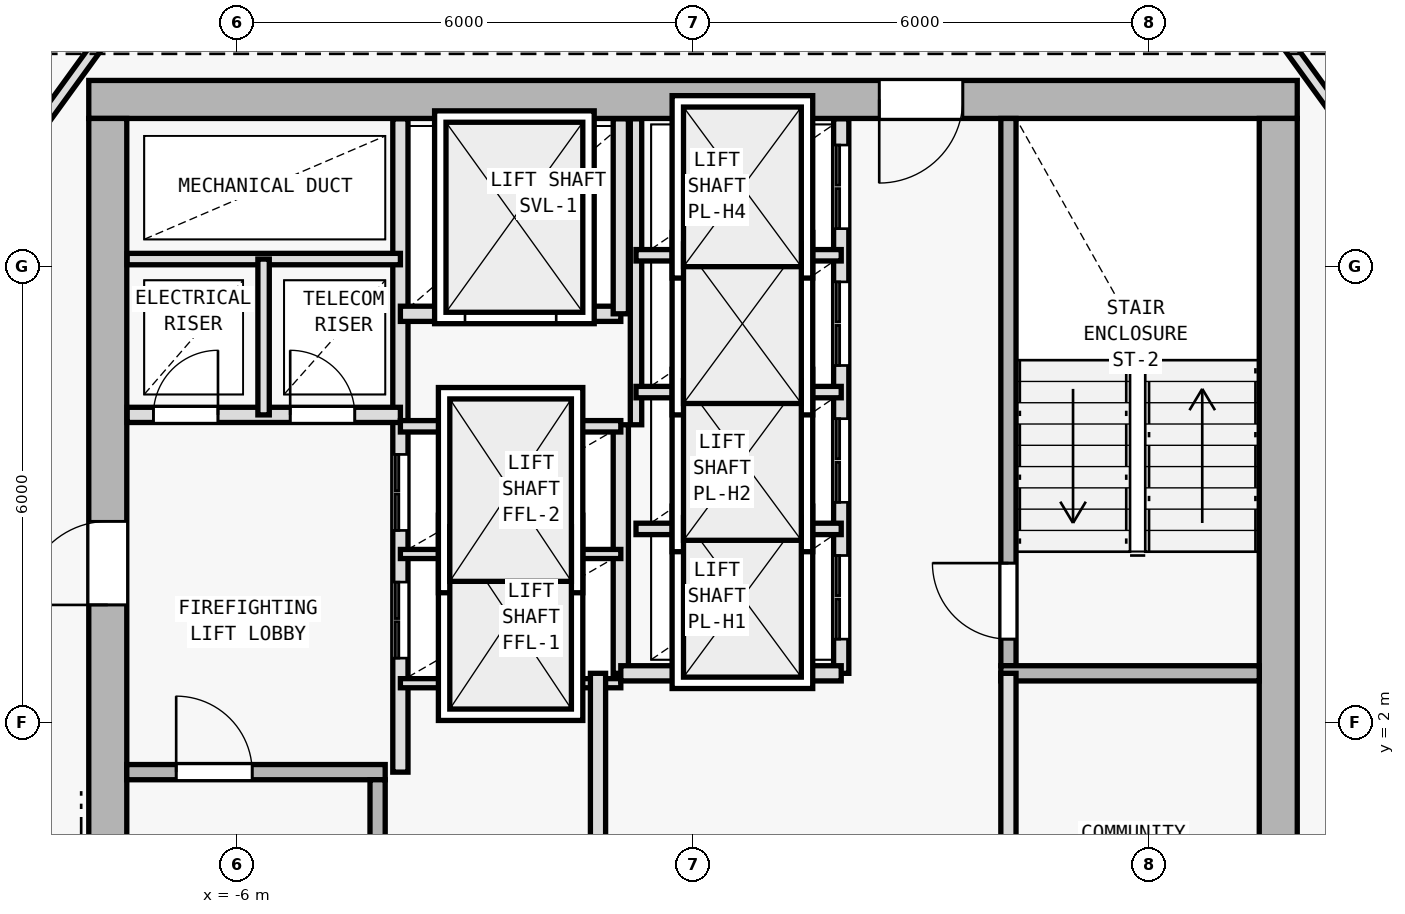
"""IFC4 building model, lengths in metres.
Left out: names, types, materials, properties, quantities, classifications, styles, units other than length and angle.
Written with IfcOpenShell. Run it as: python <this file> out.ifc"""

import sys

from ifc_helpers import new_model, si_unit, direction, frame, frame_2d, origin, origin_2d, place, context, subcontext, project, spatial, rectangle, i_section, extrude, element, fill, save


model = new_model("IFC4")
c1 = context("Model", 3, precision=1e-05, world=origin(), true_north=direction((0.0, 1.0)))
c2 = subcontext(c1, "Body", "Model", "MODEL_VIEW")
j1 = project(units=[si_unit("LENGTHUNIT", "METRE"), si_unit("PLANEANGLEUNIT", "RADIAN")], contexts=[c1])
p1 = place(None, origin())
s1 = spatial("IfcSite", under=j1, at=p1, CompositionType="ELEMENT")
p2 = place(p1, origin())
s2 = spatial("IfcBuilding", under=s1, at=p2, CompositionType="ELEMENT")
p3 = place(p2, frame((0.0, 0.0, 290.4)))
s3 = spatial("IfcBuildingStorey", under=s2, at=p3, CompositionType="ELEMENT", Elevation=290.4)
for number, where, z_axis, x_axis in (
    (1, (7.7, 10.2, 0.0), (0.0, 0.0, 1.0), (1.0, 0.0, 0.0)),
    (2, (-7.7, 10.2, 0.0), (0.0, 0.0, 1.0), (1.0, 0.0, 0.0)),
    (3, (7.7, 0.4, 0.0), (0.0, 0.0, 1.0), (1.0, 0.0, 0.0)),
    (4, (-7.7, 2.0, 0.0), (0.0, 0.0, 1.0), (1.0, 0.0, 0.0)),
):
    element("IfcColumn", number, at=place(p3, frame(where, z_axis=z_axis, x_axis=x_axis)), inside=s3, PredefinedType="COLUMN", context=c2, shape_type="SweptSolid", body=[
        extrude(i_section(OverallWidth=0.374, OverallDepth=0.372, WebThickness=0.012, FlangeThickness=0.02, FilletRadius=0.015, at=origin_2d()), origin(), (0.0, 0.0, 1.0), 3.6),
    ])
p4 = place(p3, frame((7.95, 10.2, 0.0), z_axis=(0.0, 0.0, 1.0), x_axis=(-1.0, 0.0, 0.0)))
e5 = element("IfcWall", 5, at=p4, inside=s3, PredefinedType="SHEAR", context=c2, shape_type="SweptSolid", body=[
    extrude(rectangle(XDim=15.9, YDim=0.5, at=frame_2d((7.95, 0.0))), origin(), (0.0, 0.0, 1.0), 3.15),
])
p5 = place(p4, frame((4.4, 0.0, 0.0)))
e6 = element("IfcOpeningElement", 6, at=p5, cuts=e5, PredefinedType="OPENING", context=c2, shape_type="SweptSolid", body=[
    extrude(rectangle(XDim=1.1, YDim=2.15, at=frame_2d((0.55, 1.075))), frame((0.0, 0.26, 0.0), z_axis=(0.0, -1.0, 0.0), x_axis=(1.0, 0.0, 0.0)), (0.0, 0.0, 1.0), 0.52),
])
p6 = place(p3, frame((-7.7, -9.15, 0.0), z_axis=(0.0, 0.0, 1.0), x_axis=(0.0, 1.0, 0.0)))
e7 = element("IfcWall", 7, at=p6, inside=s3, PredefinedType="SHEAR", context=c2, shape_type="SweptSolid", body=[
    extrude(rectangle(XDim=19.1, YDim=0.5, at=frame_2d((9.55, 0.0))), origin(), (0.0, 0.0, 1.0), 3.15),
])
p7 = place(p6, frame((12.7, 0.0, 0.0)))
e8 = element("IfcOpeningElement", 8, at=p7, cuts=e7, PredefinedType="OPENING", context=c2, shape_type="SweptSolid", body=[
    extrude(rectangle(XDim=1.1, YDim=2.15, at=frame_2d((0.55, 1.075))), frame((0.0, 0.26, 0.0), z_axis=(0.0, -1.0, 0.0), x_axis=(1.0, 0.0, 0.0)), (0.0, 0.0, 1.0), 0.52),
])
p8 = place(p3, frame((7.7, 9.95, 0.0), z_axis=(0.0, 0.0, 1.0), x_axis=(0.0, -1.0, 0.0)))
e9 = element("IfcWall", 9, at=p8, inside=s3, PredefinedType="SHEAR", context=c2, shape_type="SweptSolid", body=[
    extrude(rectangle(XDim=19.1, YDim=0.5, at=frame_2d((9.55, 0.0))), origin(), (0.0, 0.0, 1.0), 3.15),
])
p9 = place(p3, frame((-7.45, 1.35, 0.0), z_axis=(0.0, 0.0, 1.0), x_axis=(1.0, 0.0, 0.0)))
e10 = element("IfcWall", 10, at=p9, inside=s3, PredefinedType="SOLIDWALL", context=c2, shape_type="SweptSolid", body=[
    extrude(rectangle(XDim=3.4, YDim=0.2, at=frame_2d((1.7, 0.0))), origin(), (0.0, 0.0, 1.0), 3.15),
])
p10 = place(p9, frame((0.65, 0.0, 0.0)))
e11 = element("IfcOpeningElement", 11, at=p10, cuts=e10, PredefinedType="OPENING", context=c2, shape_type="SweptSolid", body=[
    extrude(rectangle(XDim=1.0, YDim=2.15, at=frame_2d((0.5, 1.075))), frame((0.0, 0.11, 0.0), z_axis=(0.0, -1.0, 0.0), x_axis=(1.0, 0.0, 0.0)), (0.0, 0.0, 1.0), 0.22),
])
p11 = place(p3, frame((-4.15, -5.95, 0.0), z_axis=(0.0, 0.0, 1.0), x_axis=(0.0, 1.0, 0.0)))
e12 = element("IfcWall", 12, at=p11, inside=s3, PredefinedType="SOLIDWALL", context=c2, shape_type="SweptSolid", body=[
    extrude(rectangle(XDim=7.2, YDim=0.2, at=frame_2d((3.6, 0.0))), origin(), (0.0, 0.0, 1.0), 3.15),
])
p12 = place(p3, frame((-3.85, 1.35, 0.0), z_axis=(0.0, 0.0, 1.0), x_axis=(0.0, 1.0, 0.0)))
e13 = element("IfcWall", 13, at=p12, inside=s3, PredefinedType="SOLIDWALL", context=c2, shape_type="SweptSolid", body=[
    extrude(rectangle(XDim=8.595, YDim=0.2, at=frame_2d((4.297, 0.0))), origin(), (0.0, 0.0, 1.0), 3.15),
])
p13 = place(p12, frame((1.5, 0.0, 0.0)))
e14 = element("IfcOpeningElement", 14, at=p13, cuts=e13, PredefinedType="OPENING", context=c2, shape_type="SweptSolid", body=[
    extrude(rectangle(XDim=1.0, YDim=2.15, at=frame_2d((0.5, 1.075))), frame((0.0, 0.11, 0.0), z_axis=(0.0, -1.0, 0.0), x_axis=(1.0, 0.0, 0.0)), (0.0, 0.0, 1.0), 0.22),
])
p14 = place(p12, frame((3.18, 0.0, 0.0)))
e15 = element("IfcOpeningElement", 15, at=p14, cuts=e13, PredefinedType="OPENING", context=c2, shape_type="SweptSolid", body=[
    extrude(rectangle(XDim=1.0, YDim=2.15, at=frame_2d((0.5, 1.075))), frame((0.0, 0.11, 0.0), z_axis=(0.0, -1.0, 0.0), x_axis=(1.0, 0.0, 0.0)), (0.0, 0.0, 1.0), 0.22),
])
p15 = place(p3, frame((-7.445, 6.05, 0.0), z_axis=(0.0, 0.0, 1.0), x_axis=(1.0, 0.0, 0.0)))
e16 = element("IfcWall", 16, at=p15, inside=s3, PredefinedType="SOLIDWALL", context=c2, shape_type="SweptSolid", body=[
    extrude(rectangle(XDim=3.595, YDim=0.2, at=frame_2d((1.797, 0.0))), origin(), (0.0, 0.0, 1.0), 3.15),
])
p16 = place(p15, frame((0.345, 0.0, 0.0)))
e17 = element("IfcOpeningElement", 17, at=p16, cuts=e16, PredefinedType="OPENING", context=c2, shape_type="SweptSolid", body=[
    extrude(rectangle(XDim=0.85, YDim=2.1, at=frame_2d((0.425, 1.05))), frame((0.0, 0.11, 0.0), z_axis=(0.0, -1.0, 0.0), x_axis=(1.0, 0.0, 0.0)), (0.0, 0.0, 1.0), 0.22),
])
p17 = place(p15, frame((2.145, 0.0, 0.0)))
e18 = element("IfcOpeningElement", 18, at=p17, cuts=e16, PredefinedType="OPENING", context=c2, shape_type="SweptSolid", body=[
    extrude(rectangle(XDim=0.85, YDim=2.1, at=frame_2d((0.425, 1.05))), frame((0.0, 0.11, 0.0), z_axis=(0.0, -1.0, 0.0), x_axis=(1.0, 0.0, 0.0)), (0.0, 0.0, 1.0), 0.22),
])
p18 = place(p3, frame((-7.445, 8.1, 0.0), z_axis=(0.0, 0.0, 1.0), x_axis=(1.0, 0.0, 0.0)))
e19 = element("IfcWall", 19, at=p18, inside=s3, PredefinedType="PARTITIONING", context=c2, shape_type="SweptSolid", body=[
    extrude(rectangle(XDim=3.595, YDim=0.15, at=frame_2d((1.797, 0.0))), origin(), (0.0, 0.0, 1.0), 3.15),
])
p19 = place(p3, frame((-5.65, 6.05, 0.0), z_axis=(0.0, 0.0, 1.0), x_axis=(0.0, 1.0, 0.0)))
e20 = element("IfcWall", 20, at=p19, inside=s3, PredefinedType="PARTITIONING", context=c2, shape_type="SweptSolid", body=[
    extrude(rectangle(XDim=2.05, YDim=0.15, at=frame_2d((1.025, 0.0))), origin(), (0.0, 0.0, 1.0), 3.15),
])
p20 = place(p3, frame((4.15, 2.75, 0.0), z_axis=(0.0, 0.0, 1.0), x_axis=(0.0, 1.0, 0.0)))
e21 = element("IfcWall", 21, at=p20, inside=s3, PredefinedType="SOLIDWALL", context=c2, shape_type="SweptSolid", body=[
    extrude(rectangle(XDim=7.2, YDim=0.2, at=frame_2d((3.6, 0.0))), origin(), (0.0, 0.0, 1.0), 3.15),
])
p21 = place(p20, frame((0.35, 0.0, 0.0)))
e22 = element("IfcOpeningElement", 22, at=p21, cuts=e21, PredefinedType="OPENING", context=c2, shape_type="SweptSolid", body=[
    extrude(rectangle(XDim=1.0, YDim=2.15, at=frame_2d((0.5, 1.075))), frame((0.0, 0.11, 0.0), z_axis=(0.0, -1.0, 0.0), x_axis=(1.0, 0.0, 0.0)), (0.0, 0.0, 1.0), 0.22),
])
p22 = place(p3, frame((4.05, 2.65, 0.0), z_axis=(0.0, 0.0, 1.0), x_axis=(1.0, 0.0, 0.0)))
e23 = element("IfcWall", 23, at=p22, inside=s3, PredefinedType="SOLIDWALL", context=c2, shape_type="SweptSolid", body=[
    extrude(rectangle(XDim=3.4, YDim=0.2, at=frame_2d((1.7, 0.0))), origin(), (0.0, 0.0, 1.0), 3.15),
])
p23 = place(p3, frame((-0.95, 2.65, 0.0), z_axis=(0.0, 0.0, 1.0), x_axis=(0.0, 1.0, 0.0)))
e24 = element("IfcWall", 24, at=p23, inside=s3, PredefinedType="SOLIDWALL", context=c2, shape_type="SweptSolid", body=[
    extrude(rectangle(XDim=3.27, YDim=0.2, at=frame_2d((1.635, 0.0))), origin(), (0.0, 0.0, 1.0), 3.15),
])
for number, where, z_axis, x_axis in (
    (25, (-3.85, 2.52, 0.0), (0.0, 0.0, 1.0), (1.0, 0.0, 0.0)),
    (26, (-3.85, 4.22, 0.0), (0.0, 0.0, 1.0), (1.0, 0.0, 0.0)),
):
    element("IfcWall", number, at=place(p3, frame(where, z_axis=z_axis, x_axis=x_axis)), inside=s3, PredefinedType="PARTITIONING", context=c2, shape_type="SweptSolid", body=[
        extrude(rectangle(XDim=2.9, YDim=0.12, at=frame_2d((1.45, 0.0))), origin(), (0.0, 0.0, 1.0), 3.15),
    ])
p24 = place(p3, frame((-3.85, 5.9, 0.0), z_axis=(0.0, 0.0, 1.0), x_axis=(1.0, 0.0, 0.0)))
e27 = element("IfcWall", 27, at=p24, inside=s3, PredefinedType="PARTITIONING", context=c2, shape_type="SweptSolid", body=[
    extrude(rectangle(XDim=2.9, YDim=0.15, at=frame_2d((1.45, 0.0))), origin(), (0.0, 0.0, 1.0), 3.15),
])
p25 = place(p3, frame((-3.85, 7.38, 0.0), z_axis=(0.0, 0.0, 1.0), x_axis=(1.0, 0.0, 0.0)))
e28 = element("IfcWall", 28, at=p25, inside=s3, PredefinedType="SOLIDWALL", context=c2, shape_type="SweptSolid", body=[
    extrude(rectangle(XDim=2.9, YDim=0.2, at=frame_2d((1.45, 0.0))), origin(), (0.0, 0.0, 1.0), 3.15),
])
p26 = place(p25, frame((0.85, 0.0, 0.0)))
e29 = element("IfcOpeningElement", 29, at=p26, cuts=e28, PredefinedType="OPENING", context=c2, shape_type="SweptSolid", body=[
    extrude(rectangle(XDim=1.2, YDim=2.2, at=frame_2d((0.6, 1.1))), frame((0.0, 0.11, 0.0), z_axis=(0.0, -1.0, 0.0), x_axis=(1.0, 0.0, 0.0)), (0.0, 0.0, 1.0), 0.22),
])
p27 = place(p3, frame((-0.95, 7.38, 0.0), z_axis=(0.0, 0.0, 1.0), x_axis=(0.0, 1.0, 0.0)))
e30 = element("IfcWall", 30, at=p27, inside=s3, PredefinedType="SOLIDWALL", context=c2, shape_type="SweptSolid", body=[
    extrude(rectangle(XDim=2.565, YDim=0.2, at=frame_2d((1.283, 0.0))), origin(), (0.0, 0.0, 1.0), 3.15),
])
p28 = place(p3, frame((4.15, -6.05, 0.0), z_axis=(0.0, 0.0, 1.0), x_axis=(0.0, 1.0, 0.0)))
e31 = element("IfcWall", 31, at=p28, inside=s3, PredefinedType="SOLIDWALL", context=c2, shape_type="SweptSolid", body=[
    extrude(rectangle(XDim=8.7, YDim=0.2, at=frame_2d((4.35, 0.0))), origin(), (0.0, 0.0, 1.0), 3.15),
])
p29 = place(p28, frame((3.6, 0.0, 0.0)))
e32 = element("IfcOpeningElement", 32, at=p29, cuts=e31, PredefinedType="OPENING", context=c2, shape_type="SweptSolid", body=[
    extrude(rectangle(XDim=0.95, YDim=2.1, at=frame_2d((0.475, 1.05))), frame((0.0, 0.11, 0.0), z_axis=(0.0, -1.0, 0.0), x_axis=(1.0, 0.0, 0.0)), (0.0, 0.0, 1.0), 0.22),
])
p30 = place(p3, frame((-1.25, -6.05, 0.0), z_axis=(0.0, 0.0, 1.0), x_axis=(0.0, 1.0, 0.0)))
e33 = element("IfcWall", 33, at=p30, inside=s3, PredefinedType="SOLIDWALL", context=c2, shape_type="SweptSolid", body=[
    extrude(rectangle(XDim=8.7, YDim=0.2, at=frame_2d((4.35, 0.0))), origin(), (0.0, 0.0, 1.0), 3.15),
])
p31 = place(p30, frame((3.4, 0.0, 0.0)))
e34 = element("IfcOpeningElement", 34, at=p31, cuts=e33, PredefinedType="OPENING", context=c2, shape_type="SweptSolid", body=[
    extrude(rectangle(XDim=0.95, YDim=2.1, at=frame_2d((0.475, 1.05))), frame((0.0, 0.11, 0.0), z_axis=(0.0, -1.0, 0.0), x_axis=(1.0, 0.0, 0.0)), (0.0, 0.0, 1.0), 0.22),
])
p32 = place(p3, frame((1.95, 2.65, 0.0), z_axis=(0.0, 0.0, 1.0), x_axis=(0.0, 1.0, 0.0)))
e35 = element("IfcWall", 35, at=p32, inside=s3, PredefinedType="SOLIDWALL", context=c2, shape_type="SweptSolid", body=[
    extrude(rectangle(XDim=7.295, YDim=0.2, at=frame_2d((3.647, 0.0))), origin(), (0.0, 0.0, 1.0), 3.15),
])
p33 = place(p32, frame((0.45, 0.0, 0.0)))
e36 = element("IfcOpeningElement", 36, at=p33, cuts=e35, PredefinedType="OPENING", context=c2, shape_type="SweptSolid", body=[
    extrude(rectangle(XDim=1.1, YDim=2.15, at=frame_2d((0.55, 1.075))), frame((0.0, 0.11, 0.0), z_axis=(0.0, -1.0, 0.0), x_axis=(1.0, 0.0, 0.0)), (0.0, 0.0, 1.0), 0.22),
])
p34 = place(p32, frame((2.25, 0.0, 0.0)))
e37 = element("IfcOpeningElement", 37, at=p34, cuts=e35, PredefinedType="OPENING", context=c2, shape_type="SweptSolid", body=[
    extrude(rectangle(XDim=1.1, YDim=2.15, at=frame_2d((0.55, 1.075))), frame((0.0, 0.11, 0.0), z_axis=(0.0, -1.0, 0.0), x_axis=(1.0, 0.0, 0.0)), (0.0, 0.0, 1.0), 0.22),
])
p35 = place(p32, frame((4.05, 0.0, 0.0)))
e38 = element("IfcOpeningElement", 38, at=p35, cuts=e35, PredefinedType="OPENING", context=c2, shape_type="SweptSolid", body=[
    extrude(rectangle(XDim=1.1, YDim=2.15, at=frame_2d((0.55, 1.075))), frame((0.0, 0.11, 0.0), z_axis=(0.0, -1.0, 0.0), x_axis=(1.0, 0.0, 0.0)), (0.0, 0.0, 1.0), 0.22),
])
p36 = place(p32, frame((5.85, 0.0, 0.0)))
e39 = element("IfcOpeningElement", 39, at=p36, cuts=e35, PredefinedType="OPENING", context=c2, shape_type="SweptSolid", body=[
    extrude(rectangle(XDim=1.1, YDim=2.15, at=frame_2d((0.55, 1.075))), frame((0.0, 0.11, 0.0), z_axis=(0.0, -1.0, 0.0), x_axis=(1.0, 0.0, 0.0)), (0.0, 0.0, 1.0), 0.22),
])
p37 = place(p3, frame((-0.95, 2.65, 0.0), z_axis=(0.0, 0.0, 1.0), x_axis=(1.0, 0.0, 0.0)))
e40 = element("IfcWall", 40, at=p37, inside=s3, PredefinedType="SOLIDWALL", context=c2, shape_type="SweptSolid", body=[
    extrude(rectangle(XDim=2.9, YDim=0.2, at=frame_2d((1.45, 0.0))), origin(), (0.0, 0.0, 1.0), 3.15),
])
p38 = place(p3, frame((-0.75, 5.92, 0.0), z_axis=(0.0, 0.0, 1.0), x_axis=(0.0, 1.0, 0.0)))
e41 = element("IfcWall", 41, at=p38, inside=s3, PredefinedType="PARTITIONING", context=c2, shape_type="SweptSolid", body=[
    extrude(rectangle(XDim=4.025, YDim=0.15, at=frame_2d((2.013, 0.0))), origin(), (0.0, 0.0, 1.0), 3.15),
])
for number, where, z_axis, x_axis in (
    (42, (-0.75, 4.55, 0.0), (0.0, 0.0, 1.0), (1.0, 0.0, 0.0)),
    (43, (-0.75, 6.35, 0.0), (0.0, 0.0, 1.0), (1.0, 0.0, 0.0)),
    (44, (-0.75, 8.15, 0.0), (0.0, 0.0, 1.0), (1.0, 0.0, 0.0)),
):
    element("IfcWall", number, at=place(p3, frame(where, z_axis=z_axis, x_axis=x_axis)), inside=s3, PredefinedType="PARTITIONING", context=c2, shape_type="SweptSolid", body=[
        extrude(rectangle(XDim=2.7, YDim=0.15, at=frame_2d((1.35, 0.0))), origin(), (0.0, 0.0, 1.0), 3.15),
    ])
p39 = place(p3, frame((-9.78, 8.226, 0.0), z_axis=(0.0, 0.0, 1.0), x_axis=(0.586956386413, 0.809618552436, 0.0)))
e45 = element("IfcWall", 45, at=p39, inside=s3, PredefinedType="PARTITIONING", context=c2, shape_type="SweptSolid", body=[
    extrude(rectangle(XDim=5.008, YDim=0.15, at=frame_2d((2.504, 0.0))), origin(), (0.0, 0.0, 1.0), 2.815),
])
p40 = place(p3, frame((6.841, 12.28, 0.0), z_axis=(0.0, 0.0, 1.0), x_axis=(0.586956386413, -0.809618552436, 0.0)))
e46 = element("IfcWall", 46, at=p40, inside=s3, PredefinedType="PARTITIONING", context=c2, shape_type="SweptSolid", body=[
    extrude(rectangle(XDim=5.008, YDim=0.15, at=frame_2d((2.504, 0.0))), origin(), (0.0, 0.0, 1.0), 2.675),
])
p41 = place(p7, origin())
e47 = element("IfcDoor", 47, at=p41, inside=s3, OperationType="SINGLE_SWING_LEFT", PredefinedType="DOOR", context=c2, shape_type="SweptSolid", body=[
    extrude(rectangle(XDim=1.1, YDim=2.15, at=frame_2d((0.55, 1.075))), frame((0.0, 0.025, 0.0), z_axis=(0.0, -1.0, 0.0), x_axis=(1.0, 0.0, 0.0)), (0.0, 0.0, 1.0), 0.05),
])
fill(e8, e47)
p42 = place(p5, origin())
e48 = element("IfcDoor", 48, at=p42, inside=s3, OperationType="SINGLE_SWING_RIGHT", PredefinedType="DOOR", context=c2, shape_type="SweptSolid", body=[
    extrude(rectangle(XDim=1.1, YDim=2.15, at=frame_2d((0.55, 1.075))), frame((0.0, 0.025, 0.0), z_axis=(0.0, -1.0, 0.0), x_axis=(1.0, 0.0, 0.0)), (0.0, 0.0, 1.0), 0.05),
])
fill(e6, e48)
p43 = place(p10, origin())
e49 = element("IfcDoor", 49, at=p43, inside=s3, OperationType="SINGLE_SWING_LEFT", PredefinedType="DOOR", context=c2, shape_type="SweptSolid", body=[
    extrude(rectangle(XDim=1.0, YDim=2.15, at=frame_2d((0.5, 1.075))), frame((0.0, 0.025, 0.0), z_axis=(0.0, -1.0, 0.0), x_axis=(1.0, 0.0, 0.0)), (0.0, 0.0, 1.0), 0.05),
])
fill(e11, e49)
p44 = place(p16, origin())
e50 = element("IfcDoor", 50, at=p44, inside=s3, OperationType="SINGLE_SWING_RIGHT", PredefinedType="DOOR", context=c2, shape_type="SweptSolid", body=[
    extrude(rectangle(XDim=0.85, YDim=2.1, at=frame_2d((0.425, 1.05))), frame((0.0, 0.025, 0.0), z_axis=(0.0, -1.0, 0.0), x_axis=(1.0, 0.0, 0.0)), (0.0, 0.0, 1.0), 0.05),
])
fill(e17, e50)
p45 = place(p17, origin())
e51 = element("IfcDoor", 51, at=p45, inside=s3, OperationType="SINGLE_SWING_LEFT", PredefinedType="DOOR", context=c2, shape_type="SweptSolid", body=[
    extrude(rectangle(XDim=0.85, YDim=2.1, at=frame_2d((0.425, 1.05))), frame((0.0, 0.025, 0.0), z_axis=(0.0, -1.0, 0.0), x_axis=(1.0, 0.0, 0.0)), (0.0, 0.0, 1.0), 0.05),
])
fill(e18, e51)
p46 = place(p21, origin())
e52 = element("IfcDoor", 52, at=p46, inside=s3, OperationType="SINGLE_SWING_RIGHT", PredefinedType="DOOR", context=c2, shape_type="SweptSolid", body=[
    extrude(rectangle(XDim=1.0, YDim=2.15, at=frame_2d((0.5, 1.075))), frame((0.0, 0.025, 0.0), z_axis=(0.0, -1.0, 0.0), x_axis=(1.0, 0.0, 0.0)), (0.0, 0.0, 1.0), 0.05),
])
fill(e22, e52)
p47 = place(p26, origin())
e53 = element("IfcDoor", 53, at=p47, inside=s3, OperationType="DOUBLE_DOOR_SLIDING", PredefinedType="DOOR", context=c2, shape_type="SweptSolid", body=[
    extrude(rectangle(XDim=1.2, YDim=2.2, at=frame_2d((0.6, 1.1))), frame((0.0, 0.025, 0.0), z_axis=(0.0, -1.0, 0.0), x_axis=(1.0, 0.0, 0.0)), (0.0, 0.0, 1.0), 0.05),
])
fill(e29, e53)
p48 = place(p33, origin())
e54 = element("IfcDoor", 54, at=p48, inside=s3, OperationType="DOUBLE_DOOR_SLIDING", PredefinedType="DOOR", context=c2, shape_type="SweptSolid", body=[
    extrude(rectangle(XDim=1.1, YDim=2.15, at=frame_2d((0.55, 1.075))), frame((0.0, 0.025, 0.0), z_axis=(0.0, -1.0, 0.0), x_axis=(1.0, 0.0, 0.0)), (0.0, 0.0, 1.0), 0.05),
])
fill(e36, e54)
p49 = place(p34, origin())
e55 = element("IfcDoor", 55, at=p49, inside=s3, OperationType="DOUBLE_DOOR_SLIDING", PredefinedType="DOOR", context=c2, shape_type="SweptSolid", body=[
    extrude(rectangle(XDim=1.1, YDim=2.15, at=frame_2d((0.55, 1.075))), frame((0.0, 0.025, 0.0), z_axis=(0.0, -1.0, 0.0), x_axis=(1.0, 0.0, 0.0)), (0.0, 0.0, 1.0), 0.05),
])
fill(e37, e55)
p50 = place(p35, origin())
e56 = element("IfcDoor", 56, at=p50, inside=s3, OperationType="DOUBLE_DOOR_SLIDING", PredefinedType="DOOR", context=c2, shape_type="SweptSolid", body=[
    extrude(rectangle(XDim=1.1, YDim=2.15, at=frame_2d((0.55, 1.075))), frame((0.0, 0.025, 0.0), z_axis=(0.0, -1.0, 0.0), x_axis=(1.0, 0.0, 0.0)), (0.0, 0.0, 1.0), 0.05),
])
fill(e38, e56)
p51 = place(p36, origin())
e57 = element("IfcDoor", 57, at=p51, inside=s3, OperationType="DOUBLE_DOOR_SLIDING", PredefinedType="DOOR", context=c2, shape_type="SweptSolid", body=[
    extrude(rectangle(XDim=1.1, YDim=2.15, at=frame_2d((0.55, 1.075))), frame((0.0, 0.025, 0.0), z_axis=(0.0, -1.0, 0.0), x_axis=(1.0, 0.0, 0.0)), (0.0, 0.0, 1.0), 0.05),
])
fill(e39, e57)
p52 = place(p13, origin())
e58 = element("IfcDoor", 58, at=p52, inside=s3, OperationType="DOUBLE_DOOR_SLIDING", PredefinedType="DOOR", context=c2, shape_type="SweptSolid", body=[
    extrude(rectangle(XDim=1.0, YDim=2.15, at=frame_2d((0.5, 1.075))), frame((0.0, 0.025, 0.0), z_axis=(0.0, -1.0, 0.0), x_axis=(1.0, 0.0, 0.0)), (0.0, 0.0, 1.0), 0.05),
])
fill(e14, e58)
p53 = place(p14, origin())
e59 = element("IfcDoor", 59, at=p53, inside=s3, OperationType="DOUBLE_DOOR_SLIDING", PredefinedType="DOOR", context=c2, shape_type="SweptSolid", body=[
    extrude(rectangle(XDim=1.0, YDim=2.15, at=frame_2d((0.5, 1.075))), frame((0.0, 0.025, 0.0), z_axis=(0.0, -1.0, 0.0), x_axis=(1.0, 0.0, 0.0)), (0.0, 0.0, 1.0), 0.05),
])
fill(e15, e59)
save(model, sys.argv[1])
